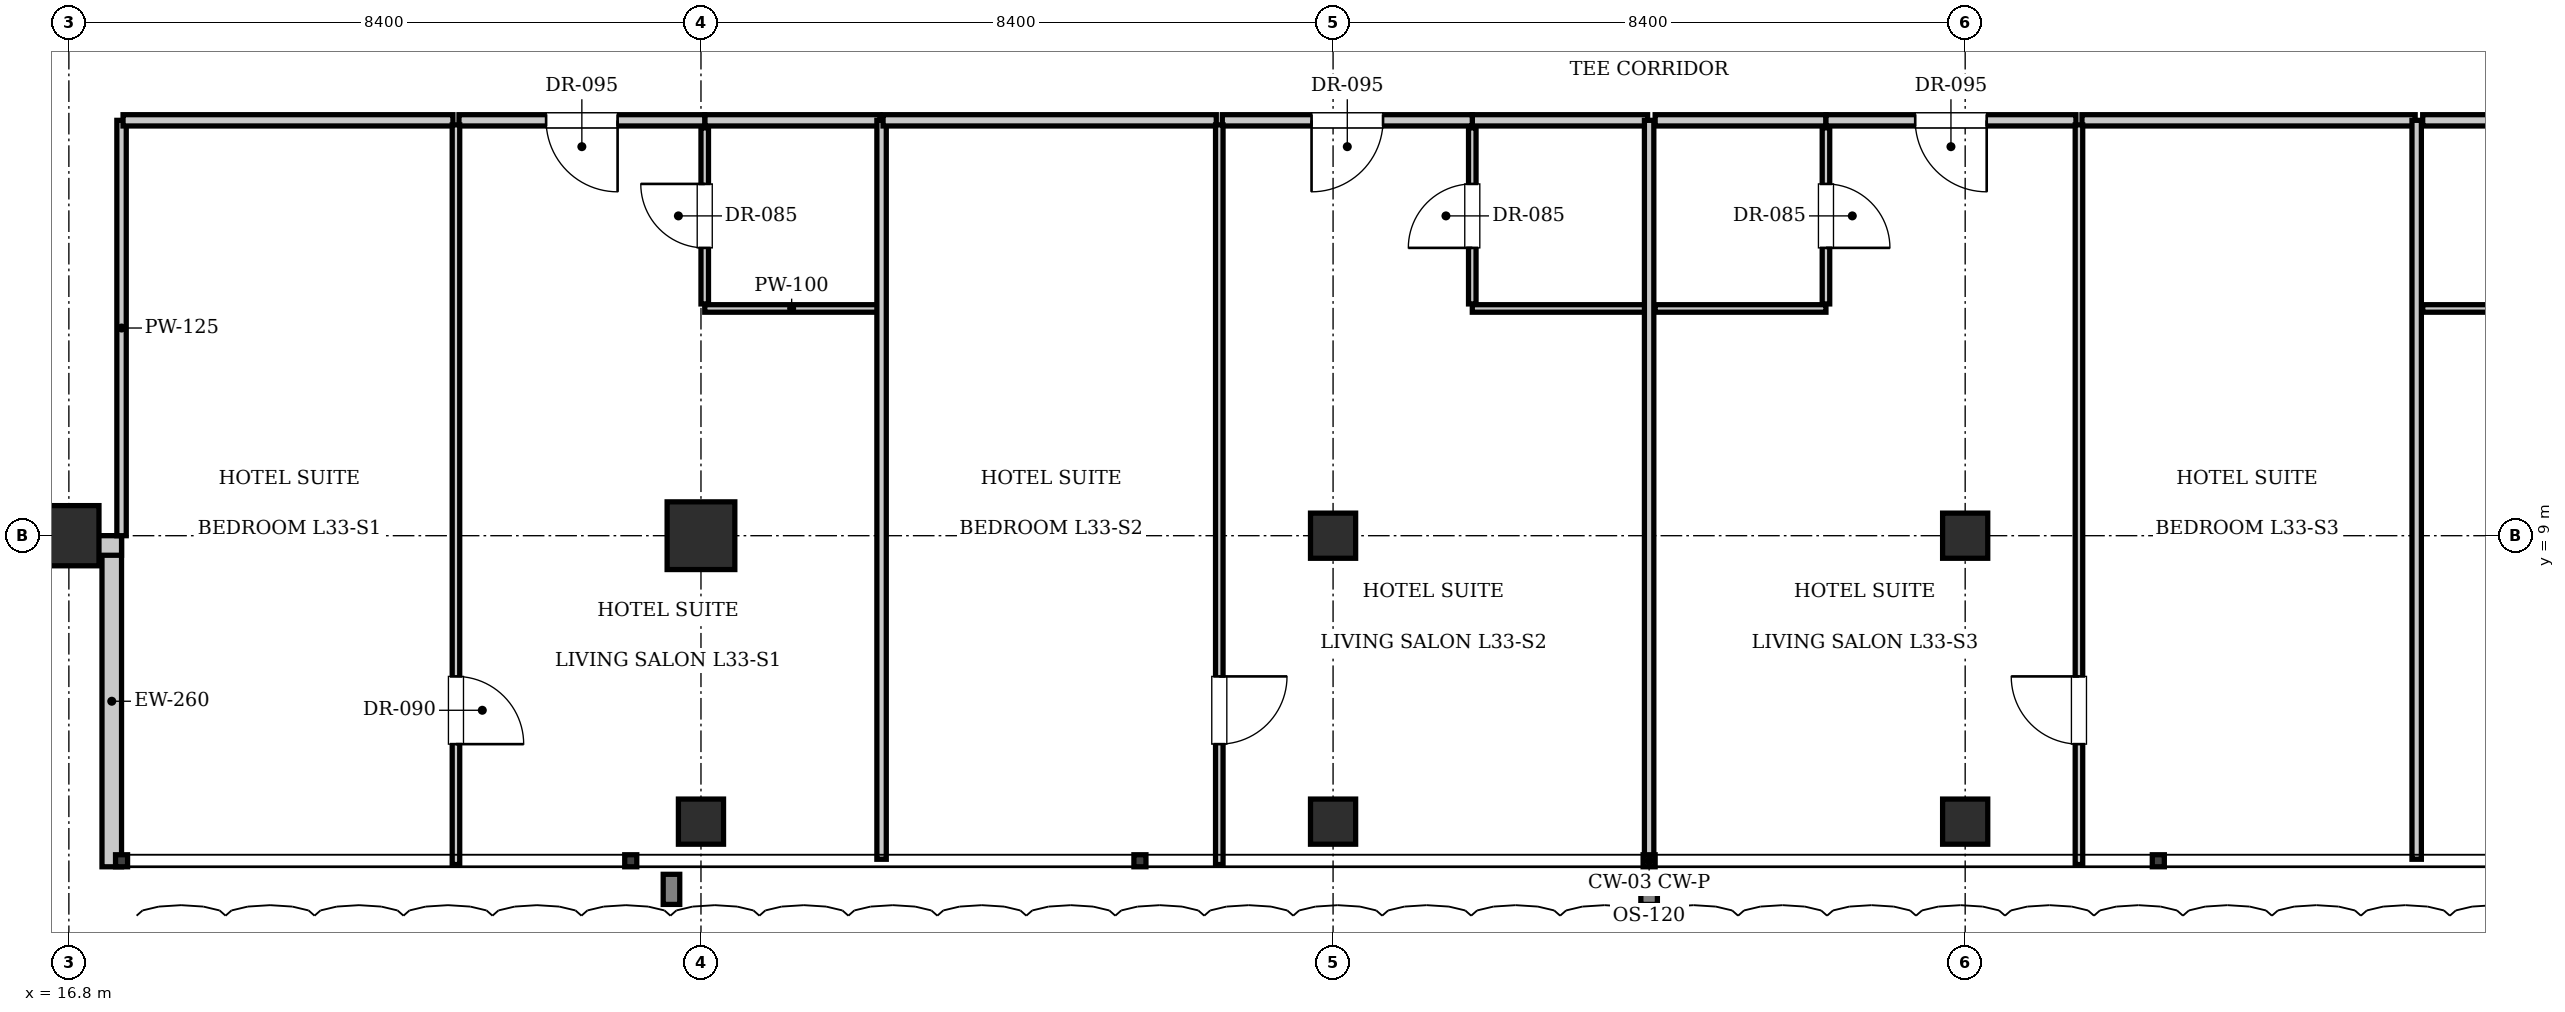
"""IFC4 building model, lengths in metres.
Left out: names, types, materials, properties, quantities, classifications, styles, units other than length and angle.
Written with IfcOpenShell. Run it as: python <this file> out.ifc"""

import sys

from ifc_helpers import new_model, si_unit, direction, frame, frame_2d, origin, origin_2d, place, context, subcontext, project, spatial, rectangle, i_section, extrude, element, fill, save


model = new_model("IFC4")
c1 = context("Model", 3, precision=1e-05, world=origin(), true_north=direction((0.0, 1.0)))
c2 = subcontext(c1, "Body", "Model", "MODEL_VIEW")
j1 = project(units=[si_unit("LENGTHUNIT", "METRE"), si_unit("PLANEANGLEUNIT", "RADIAN")], contexts=[c1])
p1 = place(None, origin())
s1 = spatial("IfcSite", under=j1, at=p1, CompositionType="ELEMENT")
p2 = place(p1, origin())
s2 = spatial("IfcBuilding", under=s1, at=p2, CompositionType="ELEMENT")
p3 = place(p2, frame((0.0, 0.0, 138.95)))
s3 = spatial("IfcBuildingStorey", under=s2, at=p3, CompositionType="ELEMENT", Elevation=138.95)
p4 = place(p3, frame((25.2, 9.0, 0.0), z_axis=(0.0, 0.0, 1.0), x_axis=(1.0, 0.0, 0.0)))
e1 = element("IfcColumn", 1, at=p4, inside=s3, PredefinedType="COLUMN", context=c2, shape_type="SweptSolid", body=[
    extrude(rectangle(XDim=0.9, YDim=0.9, at=origin_2d()), origin(), (0.0, 0.0, 1.0), 3.85),
])
for number, where, z_axis, x_axis in (
    (2, (33.6, 9.0, 0.0), (0.0, 0.0, 1.0), (1.0, 0.0, 0.0)),
    (3, (42.0, 9.0, 0.0), (0.0, 0.0, 1.0), (1.0, 0.0, 0.0)),
):
    element("IfcColumn", number, at=place(p3, frame(where, z_axis=z_axis, x_axis=x_axis)), inside=s3, PredefinedType="COLUMN", context=c2, shape_type="SweptSolid", body=[
        extrude(i_section(OverallWidth=0.6, OverallDepth=0.6, WebThickness=0.025, FlangeThickness=0.038, at=origin_2d()), origin(), (0.0, 0.0, 1.0), 3.85),
    ])
p5 = place(p3, frame((16.8, 9.0, 0.0), z_axis=(0.0, 0.0, 1.0), x_axis=(1.0, 0.0, 0.0)))
e4 = element("IfcColumn", 4, at=p5, inside=s3, PredefinedType="COLUMN", context=c2, shape_type="SweptSolid", body=[
    extrude(rectangle(XDim=0.8, YDim=0.8, at=origin_2d()), origin(), (0.0, 0.0, 1.0), 3.85),
])
for number, where, z_axis, x_axis in (
    (5, (25.2, 5.2, 0.0), (0.0, 0.0, 1.0), (1.0, 0.0, 0.0)),
    (6, (33.6, 5.2, 0.0), (0.0, 0.0, 1.0), (1.0, 0.0, 0.0)),
    (7, (42.0, 5.2, 0.0), (0.0, 0.0, 1.0), (1.0, 0.0, 0.0)),
):
    element("IfcColumn", number, at=place(p3, frame(where, z_axis=z_axis, x_axis=x_axis)), inside=s3, PredefinedType="COLUMN", context=c2, shape_type="SweptSolid", body=[
        extrude(i_section(OverallWidth=0.6, OverallDepth=0.6, WebThickness=0.025, FlangeThickness=0.038, at=origin_2d()), origin(), (0.0, 0.0, 1.0), 3.85),
    ])
p6 = place(p3, frame((17.37, 4.6, 0.0), z_axis=(0.0, 0.0, 1.0), x_axis=(0.0, 1.0, 0.0)))
e8 = element("IfcWall", 8, at=p6, inside=s3, PredefinedType="SOLIDWALL", context=c2, shape_type="SweptSolid", body=[
    extrude(rectangle(XDim=4.4, YDim=0.26, at=frame_2d((2.2, 0.0))), origin(), (0.0, 0.0, 1.0), 3.61),
])
p7 = place(p3, frame((17.5, 8.87, 0.0), z_axis=(0.0, 0.0, 1.0), x_axis=(-1.0, 0.0, 0.0)))
e9 = element("IfcWall", 9, at=p7, inside=s3, PredefinedType="SOLIDWALL", context=c2, shape_type="SweptSolid", body=[
    extrude(rectangle(XDim=4.4, YDim=0.26, at=frame_2d((2.2, 0.0))), origin(), (0.0, 0.0, 1.0), 2.998),
])
p8 = place(p3, frame((17.5, 9.0, 0.0), z_axis=(0.0, 0.0, 1.0), x_axis=(0.0, 1.0, 0.0)))
e10 = element("IfcWall", 10, at=p8, inside=s3, PredefinedType="PARTITIONING", context=c2, shape_type="SweptSolid", body=[
    extrude(rectangle(XDim=5.52, YDim=0.125, at=frame_2d((2.76, 0.0))), origin(), (0.0, 0.0, 1.0), 3.61),
])
p9 = place(p3, frame((25.25, 14.52, 0.0), z_axis=(0.0, 0.0, 1.0), x_axis=(1.0, 0.0, 0.0)))
e11 = element("IfcWall", 11, at=p9, inside=s3, PredefinedType="PARTITIONING", context=c2, shape_type="SweptSolid", body=[
    extrude(rectangle(XDim=2.33, YDim=0.15, at=frame_2d((1.165, 0.0))), origin(), (0.0, 0.0, 1.0), 3.61),
])
p10 = place(p3, frame((25.25, 12.02, 0.0), z_axis=(0.0, 0.0, 1.0), x_axis=(1.0, 0.0, 0.0)))
e12 = element("IfcWall", 12, at=p10, inside=s3, PredefinedType="PARTITIONING", context=c2, shape_type="SweptSolid", body=[
    extrude(rectangle(XDim=2.31, YDim=0.1, at=frame_2d((1.155, 0.0))), origin(), (0.0, 0.0, 1.0), 3.61),
])
p11 = place(p3, frame((25.25, 12.08, 0.0), z_axis=(0.0, 0.0, 1.0), x_axis=(0.0, 1.0, 0.0)))
e13 = element("IfcWall", 13, at=p11, inside=s3, PredefinedType="PARTITIONING", context=c2, shape_type="SweptSolid", body=[
    extrude(rectangle(XDim=2.34, YDim=0.1, at=frame_2d((1.17, 0.0))), origin(), (0.0, 0.0, 1.0), 2.998),
])
p12 = place(p11, frame((0.745, 0.0, 0.0)))
e14 = element("IfcOpeningElement", 14, at=p12, cuts=e13, PredefinedType="OPENING", context=c2, shape_type="SweptSolid", body=[
    extrude(rectangle(XDim=0.85, YDim=2.1, at=frame_2d((0.425, 1.05))), frame((0.0, 0.06, 0.0), z_axis=(0.0, -1.0, 0.0), x_axis=(1.0, 0.0, 0.0)), (0.0, 0.0, 1.0), 0.12),
])
p13 = place(p3, frame((17.52, 14.52, 0.0), z_axis=(0.0, 0.0, 1.0), x_axis=(1.0, 0.0, 0.0)))
e15 = element("IfcWall", 15, at=p13, inside=s3, PredefinedType="PARTITIONING", context=c2, shape_type="SweptSolid", body=[
    extrude(rectangle(XDim=4.384, YDim=0.15, at=frame_2d((2.192, 0.0))), origin(), (0.0, 0.0, 1.0), 3.61),
])
p14 = place(p3, frame((21.984, 14.52, 0.0), z_axis=(0.0, 0.0, 1.0), x_axis=(1.0, 0.0, 0.0)))
e16 = element("IfcWall", 16, at=p14, inside=s3, PredefinedType="PARTITIONING", context=c2, shape_type="SweptSolid", body=[
    extrude(rectangle(XDim=3.266, YDim=0.15, at=frame_2d((1.633, 0.0))), origin(), (0.0, 0.0, 1.0), 3.61),
])
p15 = place(p14, frame((1.158, 0.0, 0.0)))
e17 = element("IfcOpeningElement", 17, at=p15, cuts=e16, PredefinedType="OPENING", context=c2, shape_type="SweptSolid", body=[
    extrude(rectangle(XDim=0.95, YDim=2.15, at=frame_2d((0.475, 1.075))), frame((0.0, 0.085, 0.0), z_axis=(0.0, -1.0, 0.0), x_axis=(1.0, 0.0, 0.0)), (0.0, 0.0, 1.0), 0.17),
])
p16 = place(p3, frame((21.944, 4.63, 0.0), z_axis=(0.0, 0.0, 1.0), x_axis=(0.0, 1.0, 0.0)))
e18 = element("IfcWall", 18, at=p16, inside=s3, PredefinedType="PARTITIONING", context=c2, shape_type="SweptSolid", body=[
    extrude(rectangle(XDim=9.83, YDim=0.1, at=frame_2d((4.915, 0.0))), origin(), (0.0, 0.0, 1.0), 3.61),
])
p17 = place(p16, frame((1.6, 0.0, 0.0)))
e19 = element("IfcOpeningElement", 19, at=p17, cuts=e18, PredefinedType="OPENING", context=c2, shape_type="SweptSolid", body=[
    extrude(rectangle(XDim=0.9, YDim=2.1, at=frame_2d((0.45, 1.05))), frame((0.0, 0.06, 0.0), z_axis=(0.0, -1.0, 0.0), x_axis=(1.0, 0.0, 0.0)), (0.0, 0.0, 1.0), 0.12),
])
p18 = place(p3, frame((27.6, 4.7, 0.0), z_axis=(0.0, 0.0, 1.0), x_axis=(0.0, 1.0, 0.0)))
e20 = element("IfcWall", 20, at=p18, inside=s3, PredefinedType="PARTITIONING", context=c2, shape_type="SweptSolid", body=[
    extrude(rectangle(XDim=9.82, YDim=0.125, at=frame_2d((4.91, 0.0))), origin(), (0.0, 0.0, 1.0), 3.61),
])
p19 = place(p3, frame((35.45, 14.52, 0.0), z_axis=(0.0, 0.0, 1.0), x_axis=(1.0, 0.0, 0.0)))
e21 = element("IfcWall", 21, at=p19, inside=s3, PredefinedType="PARTITIONING", context=c2, shape_type="SweptSolid", body=[
    extrude(rectangle(XDim=2.33, YDim=0.15, at=frame_2d((1.165, 0.0))), origin(), (0.0, 0.0, 1.0), 3.61),
])
p20 = place(p3, frame((35.45, 12.02, 0.0), z_axis=(0.0, 0.0, 1.0), x_axis=(1.0, 0.0, 0.0)))
e22 = element("IfcWall", 22, at=p20, inside=s3, PredefinedType="PARTITIONING", context=c2, shape_type="SweptSolid", body=[
    extrude(rectangle(XDim=2.31, YDim=0.1, at=frame_2d((1.155, 0.0))), origin(), (0.0, 0.0, 1.0), 3.61),
])
p21 = place(p3, frame((35.45, 12.08, 0.0), z_axis=(0.0, 0.0, 1.0), x_axis=(0.0, 1.0, 0.0)))
e23 = element("IfcWall", 23, at=p21, inside=s3, PredefinedType="PARTITIONING", context=c2, shape_type="SweptSolid", body=[
    extrude(rectangle(XDim=2.34, YDim=0.1, at=frame_2d((1.17, 0.0))), origin(), (0.0, 0.0, 1.0), 3.61),
])
p22 = place(p21, frame((0.745, 0.0, 0.0)))
e24 = element("IfcOpeningElement", 24, at=p22, cuts=e23, PredefinedType="OPENING", context=c2, shape_type="SweptSolid", body=[
    extrude(rectangle(XDim=0.85, YDim=2.1, at=frame_2d((0.425, 1.05))), frame((0.0, 0.06, 0.0), z_axis=(0.0, -1.0, 0.0), x_axis=(1.0, 0.0, 0.0)), (0.0, 0.0, 1.0), 0.12),
])
p23 = place(p3, frame((27.62, 14.52, 0.0), z_axis=(0.0, 0.0, 1.0), x_axis=(1.0, 0.0, 0.0)))
e25 = element("IfcWall", 25, at=p23, inside=s3, PredefinedType="PARTITIONING", context=c2, shape_type="SweptSolid", body=[
    extrude(rectangle(XDim=4.428, YDim=0.15, at=frame_2d((2.214, 0.0))), origin(), (0.0, 0.0, 1.0), 3.61),
])
p24 = place(p3, frame((32.128, 14.52, 0.0), z_axis=(0.0, 0.0, 1.0), x_axis=(1.0, 0.0, 0.0)))
e26 = element("IfcWall", 26, at=p24, inside=s3, PredefinedType="PARTITIONING", context=c2, shape_type="SweptSolid", body=[
    extrude(rectangle(XDim=3.322, YDim=0.15, at=frame_2d((1.661, 0.0))), origin(), (0.0, 0.0, 1.0), 3.61),
])
p25 = place(p24, frame((1.186, 0.0, 0.0)))
e27 = element("IfcOpeningElement", 27, at=p25, cuts=e26, PredefinedType="OPENING", context=c2, shape_type="SweptSolid", body=[
    extrude(rectangle(XDim=0.95, YDim=2.15, at=frame_2d((0.475, 1.075))), frame((0.0, 0.085, 0.0), z_axis=(0.0, -1.0, 0.0), x_axis=(1.0, 0.0, 0.0)), (0.0, 0.0, 1.0), 0.17),
])
p26 = place(p3, frame((32.088, 4.63, 0.0), z_axis=(0.0, 0.0, 1.0), x_axis=(0.0, 1.0, 0.0)))
e28 = element("IfcWall", 28, at=p26, inside=s3, PredefinedType="PARTITIONING", context=c2, shape_type="SweptSolid", body=[
    extrude(rectangle(XDim=9.83, YDim=0.1, at=frame_2d((4.915, 0.0))), origin(), (0.0, 0.0, 1.0), 3.61),
])
p27 = place(p26, frame((1.6, 0.0, 0.0)))
e29 = element("IfcOpeningElement", 29, at=p27, cuts=e28, PredefinedType="OPENING", context=c2, shape_type="SweptSolid", body=[
    extrude(rectangle(XDim=0.9, YDim=2.1, at=frame_2d((0.45, 1.05))), frame((0.0, 0.06, 0.0), z_axis=(0.0, -1.0, 0.0), x_axis=(1.0, 0.0, 0.0)), (0.0, 0.0, 1.0), 0.12),
])
p28 = place(p3, frame((37.8, 4.7, 0.0), z_axis=(0.0, 0.0, 1.0), x_axis=(0.0, 1.0, 0.0)))
e30 = element("IfcWall", 30, at=p28, inside=s3, PredefinedType="PARTITIONING", context=c2, shape_type="SweptSolid", body=[
    extrude(rectangle(XDim=9.82, YDim=0.125, at=frame_2d((4.91, 0.0))), origin(), (0.0, 0.0, 1.0), 3.255),
])
p29 = place(p3, frame((37.88, 14.52, 0.0), z_axis=(0.0, 0.0, 1.0), x_axis=(1.0, 0.0, 0.0)))
e31 = element("IfcWall", 31, at=p29, inside=s3, PredefinedType="PARTITIONING", context=c2, shape_type="SweptSolid", body=[
    extrude(rectangle(XDim=2.27, YDim=0.15, at=frame_2d((1.135, 0.0))), origin(), (0.0, 0.0, 1.0), 3.61),
])
p30 = place(p3, frame((37.88, 12.02, 0.0), z_axis=(0.0, 0.0, 1.0), x_axis=(1.0, 0.0, 0.0)))
e32 = element("IfcWall", 32, at=p30, inside=s3, PredefinedType="PARTITIONING", context=c2, shape_type="SweptSolid", body=[
    extrude(rectangle(XDim=2.27, YDim=0.1, at=frame_2d((1.135, 0.0))), origin(), (0.0, 0.0, 1.0), 3.61),
])
p31 = place(p3, frame((40.15, 12.08, 0.0), z_axis=(0.0, 0.0, 1.0), x_axis=(0.0, 1.0, 0.0)))
e33 = element("IfcWall", 33, at=p31, inside=s3, PredefinedType="PARTITIONING", context=c2, shape_type="SweptSolid", body=[
    extrude(rectangle(XDim=2.34, YDim=0.1, at=frame_2d((1.17, 0.0))), origin(), (0.0, 0.0, 1.0), 3.61),
])
p32 = place(p31, frame((0.745, 0.0, 0.0)))
e34 = element("IfcOpeningElement", 34, at=p32, cuts=e33, PredefinedType="OPENING", context=c2, shape_type="SweptSolid", body=[
    extrude(rectangle(XDim=0.85, YDim=2.1, at=frame_2d((0.425, 1.05))), frame((0.0, 0.06, 0.0), z_axis=(0.0, -1.0, 0.0), x_axis=(1.0, 0.0, 0.0)), (0.0, 0.0, 1.0), 0.12),
])
p33 = place(p3, frame((40.15, 14.52, 0.0), z_axis=(0.0, 0.0, 1.0), x_axis=(1.0, 0.0, 0.0)))
e35 = element("IfcWall", 35, at=p33, inside=s3, PredefinedType="PARTITIONING", context=c2, shape_type="SweptSolid", body=[
    extrude(rectangle(XDim=3.322, YDim=0.15, at=frame_2d((1.661, 0.0))), origin(), (0.0, 0.0, 1.0), 3.61),
])
p34 = place(p33, frame((1.186, 0.0, 0.0)))
e36 = element("IfcOpeningElement", 36, at=p34, cuts=e35, PredefinedType="OPENING", context=c2, shape_type="SweptSolid", body=[
    extrude(rectangle(XDim=0.95, YDim=2.15, at=frame_2d((0.475, 1.075))), frame((0.0, 0.085, 0.0), z_axis=(0.0, -1.0, 0.0), x_axis=(1.0, 0.0, 0.0)), (0.0, 0.0, 1.0), 0.17),
])
p35 = place(p3, frame((43.552, 14.52, 0.0), z_axis=(0.0, 0.0, 1.0), x_axis=(1.0, 0.0, 0.0)))
e37 = element("IfcWall", 37, at=p35, inside=s3, PredefinedType="PARTITIONING", context=c2, shape_type="SweptSolid", body=[
    extrude(rectangle(XDim=4.428, YDim=0.15, at=frame_2d((2.214, 0.0))), origin(), (0.0, 0.0, 1.0), 3.61),
])
p36 = place(p3, frame((43.512, 4.63, 0.0), z_axis=(0.0, 0.0, 1.0), x_axis=(0.0, 1.0, 0.0)))
e38 = element("IfcWall", 38, at=p36, inside=s3, PredefinedType="PARTITIONING", context=c2, shape_type="SweptSolid", body=[
    extrude(rectangle(XDim=9.83, YDim=0.1, at=frame_2d((4.915, 0.0))), origin(), (0.0, 0.0, 1.0), 3.61),
])
p37 = place(p36, frame((1.6, 0.0, 0.0)))
e39 = element("IfcOpeningElement", 39, at=p37, cuts=e38, PredefinedType="OPENING", context=c2, shape_type="SweptSolid", body=[
    extrude(rectangle(XDim=0.9, YDim=2.1, at=frame_2d((0.45, 1.05))), frame((0.0, 0.06, 0.0), z_axis=(0.0, -1.0, 0.0), x_axis=(1.0, 0.0, 0.0)), (0.0, 0.0, 1.0), 0.12),
])
p38 = place(p3, frame((48.0, 4.7, 0.0), z_axis=(0.0, 0.0, 1.0), x_axis=(0.0, 1.0, 0.0)))
e40 = element("IfcWall", 40, at=p38, inside=s3, PredefinedType="PARTITIONING", context=c2, shape_type="SweptSolid", body=[
    extrude(rectangle(XDim=9.82, YDim=0.125, at=frame_2d((4.91, 0.0))), origin(), (0.0, 0.0, 1.0), 3.61),
])
p39 = place(p3, frame((48.08, 14.52, 0.0), z_axis=(0.0, 0.0, 1.0), x_axis=(1.0, 0.0, 0.0)))
e41 = element("IfcWall", 41, at=p39, inside=s3, PredefinedType="PARTITIONING", context=c2, shape_type="SweptSolid", body=[
    extrude(rectangle(XDim=2.27, YDim=0.15, at=frame_2d((1.135, 0.0))), origin(), (0.0, 0.0, 1.0), 3.61),
])
p40 = place(p3, frame((48.08, 12.02, 0.0), z_axis=(0.0, 0.0, 1.0), x_axis=(1.0, 0.0, 0.0)))
e42 = element("IfcWall", 42, at=p40, inside=s3, PredefinedType="PARTITIONING", context=c2, shape_type="SweptSolid", body=[
    extrude(rectangle(XDim=2.27, YDim=0.1, at=frame_2d((1.135, 0.0))), origin(), (0.0, 0.0, 1.0), 3.61),
])
p41 = place(p12, origin())
e43 = element("IfcDoor", 43, at=p41, inside=s3, OperationType="SINGLE_SWING_RIGHT", PredefinedType="DOOR", context=c2, shape_type="SweptSolid", body=[
    extrude(rectangle(XDim=0.85, YDim=2.1, at=frame_2d((0.425, 1.05))), frame((0.0, 0.025, 0.0), z_axis=(0.0, -1.0, 0.0), x_axis=(1.0, 0.0, 0.0)), (0.0, 0.0, 1.0), 0.05),
])
fill(e14, e43)
p42 = place(p15, frame((0.95, 0.0, 0.0), z_axis=(0.0, 0.0, 1.0), x_axis=(-1.0, 0.0, 0.0)))
e44 = element("IfcDoor", 44, at=p42, inside=s3, OperationType="SINGLE_SWING_LEFT", PredefinedType="DOOR", context=c2, shape_type="SweptSolid", body=[
    extrude(rectangle(XDim=0.95, YDim=2.15, at=frame_2d((0.475, 1.075))), frame((0.0, 0.025, 0.0), z_axis=(0.0, -1.0, 0.0), x_axis=(1.0, 0.0, 0.0)), (0.0, 0.0, 1.0), 0.05),
])
fill(e17, e44)
p43 = place(p17, frame((0.9, 0.0, 0.0), z_axis=(0.0, 0.0, 1.0), x_axis=(-1.0, 0.0, 0.0)))
e45 = element("IfcDoor", 45, at=p43, inside=s3, OperationType="SINGLE_SWING_RIGHT", PredefinedType="DOOR", context=c2, shape_type="SweptSolid", body=[
    extrude(rectangle(XDim=0.9, YDim=2.1, at=frame_2d((0.45, 1.05))), frame((0.0, 0.025, 0.0), z_axis=(0.0, -1.0, 0.0), x_axis=(1.0, 0.0, 0.0)), (0.0, 0.0, 1.0), 0.05),
])
fill(e19, e45)
p44 = place(p22, origin())
e46 = element("IfcDoor", 46, at=p44, inside=s3, OperationType="SINGLE_SWING_LEFT", PredefinedType="DOOR", context=c2, shape_type="SweptSolid", body=[
    extrude(rectangle(XDim=0.85, YDim=2.1, at=frame_2d((0.425, 1.05))), frame((0.0, 0.025, 0.0), z_axis=(0.0, -1.0, 0.0), x_axis=(1.0, 0.0, 0.0)), (0.0, 0.0, 1.0), 0.05),
])
fill(e24, e46)
p45 = place(p25, frame((0.95, 0.0, 0.0), z_axis=(0.0, 0.0, 1.0), x_axis=(-1.0, 0.0, 0.0)))
e47 = element("IfcDoor", 47, at=p45, inside=s3, OperationType="SINGLE_SWING_RIGHT", PredefinedType="DOOR", context=c2, shape_type="SweptSolid", body=[
    extrude(rectangle(XDim=0.95, YDim=2.15, at=frame_2d((0.475, 1.075))), frame((0.0, 0.025, 0.0), z_axis=(0.0, -1.0, 0.0), x_axis=(1.0, 0.0, 0.0)), (0.0, 0.0, 1.0), 0.05),
])
fill(e27, e47)
p46 = place(p27, frame((0.9, 0.0, 0.0), z_axis=(0.0, 0.0, 1.0), x_axis=(-1.0, 0.0, 0.0)))
e48 = element("IfcDoor", 48, at=p46, inside=s3, OperationType="SINGLE_SWING_LEFT", PredefinedType="DOOR", context=c2, shape_type="SweptSolid", body=[
    extrude(rectangle(XDim=0.9, YDim=2.1, at=frame_2d((0.45, 1.05))), frame((0.0, 0.025, 0.0), z_axis=(0.0, -1.0, 0.0), x_axis=(1.0, 0.0, 0.0)), (0.0, 0.0, 1.0), 0.05),
])
fill(e29, e48)
p47 = place(p32, frame((0.85, 0.0, 0.0), z_axis=(0.0, 0.0, 1.0), x_axis=(-1.0, 0.0, 0.0)))
e49 = element("IfcDoor", 49, at=p47, inside=s3, OperationType="SINGLE_SWING_RIGHT", PredefinedType="DOOR", context=c2, shape_type="SweptSolid", body=[
    extrude(rectangle(XDim=0.85, YDim=2.1, at=frame_2d((0.425, 1.05))), frame((0.0, 0.025, 0.0), z_axis=(0.0, -1.0, 0.0), x_axis=(1.0, 0.0, 0.0)), (0.0, 0.0, 1.0), 0.05),
])
fill(e34, e49)
p48 = place(p34, frame((0.95, 0.0, 0.0), z_axis=(0.0, 0.0, 1.0), x_axis=(-1.0, 0.0, 0.0)))
e50 = element("IfcDoor", 50, at=p48, inside=s3, OperationType="SINGLE_SWING_LEFT", PredefinedType="DOOR", context=c2, shape_type="SweptSolid", body=[
    extrude(rectangle(XDim=0.95, YDim=2.15, at=frame_2d((0.475, 1.075))), frame((0.0, 0.025, 0.0), z_axis=(0.0, -1.0, 0.0), x_axis=(1.0, 0.0, 0.0)), (0.0, 0.0, 1.0), 0.05),
])
fill(e36, e50)
p49 = place(p37, origin())
e51 = element("IfcDoor", 51, at=p49, inside=s3, OperationType="SINGLE_SWING_RIGHT", PredefinedType="DOOR", context=c2, shape_type="SweptSolid", body=[
    extrude(rectangle(XDim=0.9, YDim=2.1, at=frame_2d((0.45, 1.05))), frame((0.0, 0.025, 0.0), z_axis=(0.0, -1.0, 0.0), x_axis=(1.0, 0.0, 0.0)), (0.0, 0.0, 1.0), 0.05),
])
fill(e39, e51)
save(model, sys.argv[1])
